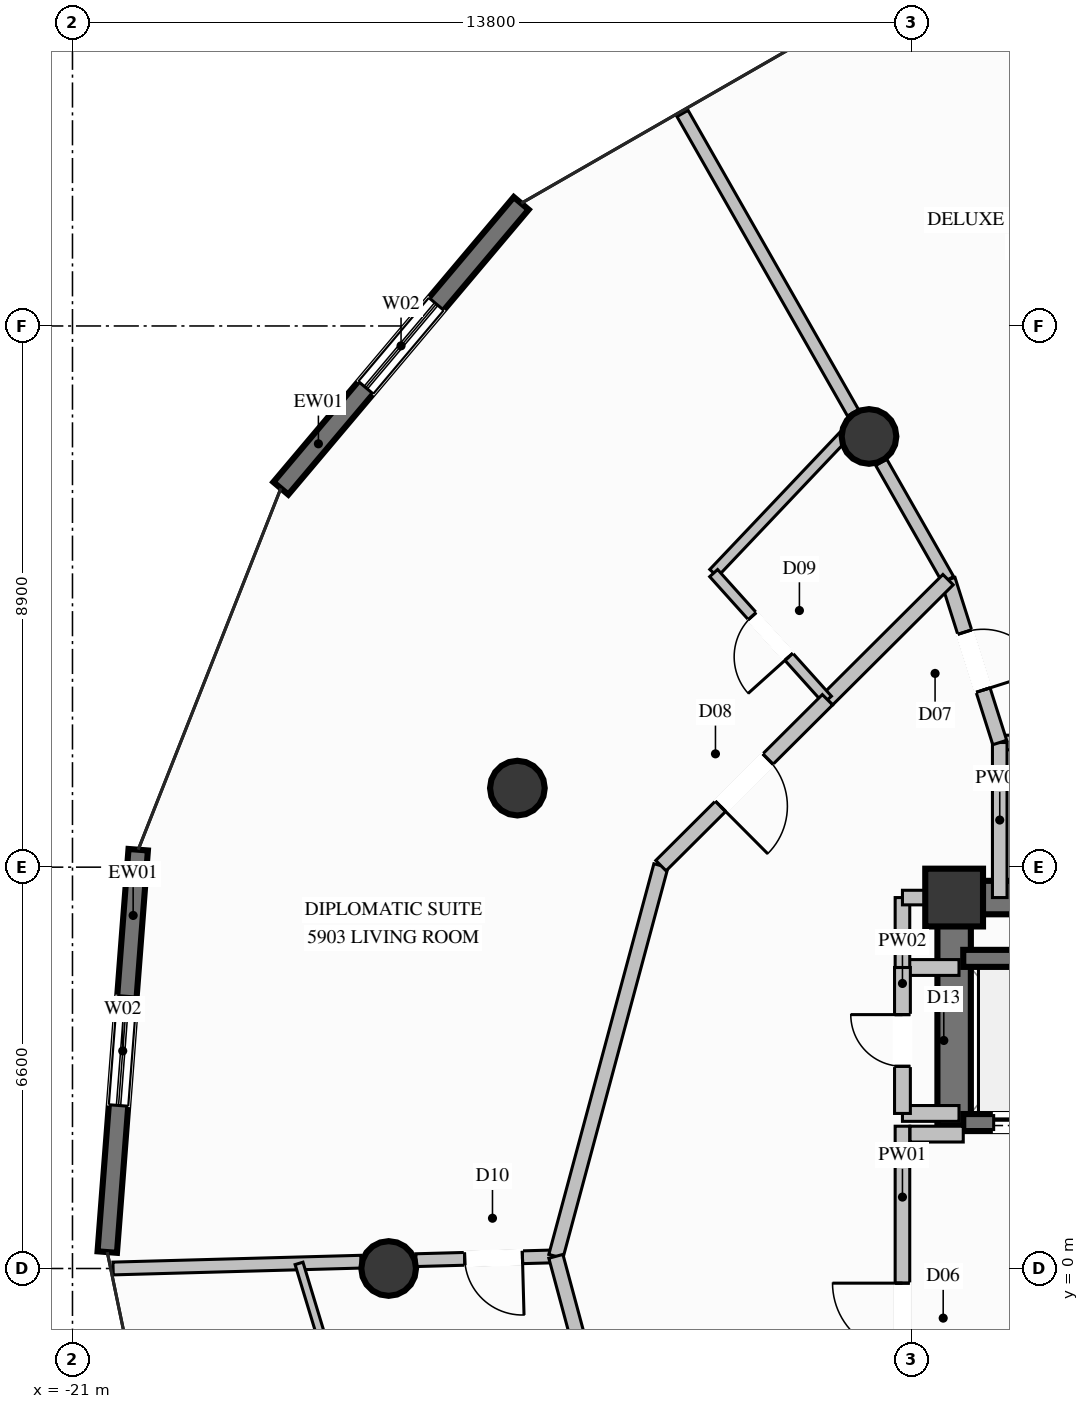
"""IFC4 building model, lengths in metres.
Left out: names, types, materials, properties, quantities, classifications, styles, units other than length and angle.
Written with IfcOpenShell. Run it as: python <this file> out.ifc"""

import sys

from ifc_helpers import new_model, si_unit, direction, frame, frame_2d, origin, origin_2d, place, context, subcontext, project, spatial, rectangle, circle, extrude, element, fill, save


model = new_model("IFC4")
c1 = context("Model", 3, precision=1e-05, world=origin(), true_north=direction((0.0, 1.0)))
c2 = subcontext(c1, "Body", "Model", "MODEL_VIEW")
j1 = project(units=[si_unit("LENGTHUNIT", "METRE"), si_unit("PLANEANGLEUNIT", "RADIAN")], contexts=[c1])
p1 = place(None, origin())
s1 = spatial("IfcSite", under=j1, at=p1, CompositionType="ELEMENT")
p2 = place(p1, origin())
s2 = spatial("IfcBuilding", under=s1, at=p2, CompositionType="ELEMENT")
p3 = place(p2, frame((0.0, 0.0, 220.0)))
s3 = spatial("IfcBuildingStorey", under=s2, at=p3, CompositionType="ELEMENT", Elevation=220.0)
p4 = place(p3, frame((-6.5, 6.1, 0.0), z_axis=(0.0, 0.0, 1.0), x_axis=(1.0, 0.0, 0.0)))
e1 = element("IfcColumn", 1, at=p4, inside=s3, PredefinedType="COLUMN", context=c2, shape_type="SweptSolid", body=[
    extrude(rectangle(XDim=0.95, YDim=0.95, at=origin_2d()), origin(), (0.0, 0.0, 1.0), 3.6),
])
p5 = place(p3, frame((-6.225, 6.1, 0.0), z_axis=(0.0, 0.0, 1.0), x_axis=(1.0, 0.0, 0.0)))
e2 = element("IfcWall", 2, at=p5, inside=s3, PredefinedType="SHEAR", context=c2, shape_type="SweptSolid", body=[
    extrude(rectangle(XDim=2.625, YDim=0.55, at=frame_2d((1.312, 0.0))), origin(), (0.0, 0.0, 1.0), 3.6),
])
p6 = place(p3, frame((-6.5, 2.35, 0.0), z_axis=(0.0, 0.0, 1.0), x_axis=(0.0, 1.0, 0.0)))
e3 = element("IfcWall", 3, at=p6, inside=s3, PredefinedType="SHEAR", context=c2, shape_type="SweptSolid", body=[
    extrude(rectangle(XDim=4.025, YDim=0.55, at=frame_2d((2.012, 0.0))), origin(), (0.0, 0.0, 1.0), 3.6),
])
for number, where, z_axis, x_axis in (
    (4, (-7.9, 13.683, 0.0), (0.0, 0.0, 1.0), (1.0, 0.0, 0.0)),
    (5, (-13.683, 7.9, 0.0), (0.0, 0.0, 1.0), (1.0, 0.0, 0.0)),
    (6, (-15.8, 0.0, 0.0), (0.0, 0.0, 1.0), (1.0, 0.0, 0.0)),
):
    element("IfcColumn", number, at=place(p3, frame(where, z_axis=z_axis, x_axis=x_axis)), inside=s3, PredefinedType="COLUMN", context=c2, shape_type="SweptSolid", body=[
        extrude(circle(Radius=0.45, at=origin_2d()), origin(), (0.0, 0.0, 1.0), 3.6),
    ])
p7 = place(p3, frame((-17.573, 12.83, 0.0), z_axis=(0.0, 0.0, 1.0), x_axis=(0.644700837275, 0.764434974616, 0.0)))
e7 = element("IfcWall", 7, at=p7, inside=s3, PredefinedType="SOLIDWALL", context=c2, shape_type="SweptSolid", body=[
    extrude(rectangle(XDim=6.131, YDim=0.32, at=frame_2d((3.066, 0.0))), origin(), (0.0, 0.0, 1.0), 3.36),
])
p8 = place(p7, frame((2.166, 0.0, 0.35)))
e8 = element("IfcOpeningElement", 8, at=p8, cuts=e7, PredefinedType="OPENING", context=c2, shape_type="SweptSolid", body=[
    extrude(rectangle(XDim=1.8, YDim=2.6, at=frame_2d((0.9, 1.3))), frame((0.0, 0.17, 0.0), z_axis=(0.0, -1.0, 0.0), x_axis=(1.0, 0.0, 0.0)), (0.0, 0.0, 1.0), 0.34),
])
p9 = place(p3, frame((-20.428, 0.27, 0.0), z_axis=(0.0, 0.0, 1.0), x_axis=(0.076702125221, 0.997054052691, 0.0)))
e9 = element("IfcWall", 9, at=p9, inside=s3, PredefinedType="SOLIDWALL", context=c2, shape_type="SweptSolid", body=[
    extrude(rectangle(XDim=6.636, YDim=0.32, at=frame_2d((3.318, 0.0))), origin(), (0.0, 0.0, 1.0), 3.36),
])
p10 = place(p9, frame((2.418, 0.0, 0.35)))
e10 = element("IfcOpeningElement", 10, at=p10, cuts=e9, PredefinedType="OPENING", context=c2, shape_type="SweptSolid", body=[
    extrude(rectangle(XDim=1.8, YDim=2.6, at=frame_2d((0.9, 1.3))), frame((0.0, 0.17, 0.0), z_axis=(0.0, -1.0, 0.0), x_axis=(1.0, 0.0, 0.0)), (0.0, 0.0, 1.0), 0.34),
])
p11 = place(p3, frame((-6.35, 2.4, 0.0), z_axis=(0.0, 0.0, 1.0), x_axis=(1.0, 0.0, 0.0)))
e11 = element("IfcWall", 11, at=p11, inside=s3, PredefinedType="SOLIDWALL", context=c2, shape_type="SweptSolid", body=[
    extrude(rectangle(XDim=2.2, YDim=0.28, at=frame_2d((1.1, 0.0))), origin(), (0.0, 0.0, 1.0), 3.36),
])
p12 = place(p11, frame((0.5, 0.0, 0.0)))
e12 = element("IfcOpeningElement", 12, at=p12, cuts=e11, PredefinedType="OPENING", context=c2, shape_type="SweptSolid", body=[
    extrude(rectangle(XDim=1.2, YDim=2.2, at=frame_2d((0.6, 1.1))), frame((0.0, 0.15, 0.0), z_axis=(0.0, -1.0, 0.0), x_axis=(1.0, 0.0, 0.0)), (0.0, 0.0, 1.0), 0.3),
])
p13 = place(p3, frame((-4.15, 5.1, 0.0), z_axis=(0.0, 0.0, 1.0), x_axis=(-1.0, 0.0, 0.0)))
e13 = element("IfcWall", 13, at=p13, inside=s3, PredefinedType="SOLIDWALL", context=c2, shape_type="SweptSolid", body=[
    extrude(rectangle(XDim=2.2, YDim=0.28, at=frame_2d((1.1, 0.0))), origin(), (0.0, 0.0, 1.0), 3.36),
])
p14 = place(p3, frame((-7.35, -2.78, 0.0), z_axis=(0.0, 0.0, 1.0), x_axis=(0.0, 1.0, 0.0)))
e14 = element("IfcWall", 14, at=p14, inside=s3, PredefinedType="PARTITIONING", context=c2, shape_type="SweptSolid", body=[
    extrude(rectangle(XDim=5.12, YDim=0.24, at=frame_2d((2.56, 0.0))), origin(), (0.0, 0.0, 1.0), 2.445),
])
p15 = place(p14, frame((1.389, 0.0, 0.0)))
e15 = element("IfcOpeningElement", 15, at=p15, cuts=e14, PredefinedType="OPENING", context=c2, shape_type="SweptSolid", body=[
    extrude(rectangle(XDim=1.15, YDim=2.2, at=frame_2d((0.575, 1.1))), frame((0.0, 0.13, 0.0), z_axis=(0.0, -1.0, 0.0), x_axis=(1.0, 0.0, 0.0)), (0.0, 0.0, 1.0), 0.26),
])
p16 = place(p3, frame((-7.225, 2.21, 0.0), z_axis=(0.0, 0.0, 1.0), x_axis=(1.0, 0.0, 0.0)))
e16 = element("IfcWall", 16, at=p16, inside=s3, PredefinedType="PARTITIONING", context=c2, shape_type="SweptSolid", body=[
    extrude(rectangle(XDim=0.875, YDim=0.26, at=frame_2d((0.438, 0.0))), origin(), (0.0, 0.0, 1.0), 3.36),
])
for number, where, z_axis, x_axis in (
    (17, (-7.35, 4.95, 0.0), (0.0, 0.0, 1.0), (1.0, 0.0, 0.0)),
    (18, (-7.35, 2.55, 0.0), (0.0, 0.0, 1.0), (1.0, 0.0, 0.0)),
):
    element("IfcWall", number, at=place(p3, frame(where, z_axis=z_axis, x_axis=x_axis)), inside=s3, PredefinedType="PARTITIONING", context=c2, shape_type="SweptSolid", body=[
        extrude(rectangle(XDim=0.93, YDim=0.26, at=frame_2d((0.465, 0.0))), origin(), (0.0, 0.0, 1.0), 3.36),
    ])
p17 = place(p3, frame((-7.35, 2.55, 0.0), z_axis=(0.0, 0.0, 1.0), x_axis=(0.0, 1.0, 0.0)))
e19 = element("IfcWall", 19, at=p17, inside=s3, PredefinedType="PARTITIONING", context=c2, shape_type="SweptSolid", body=[
    extrude(rectangle(XDim=2.4, YDim=0.26, at=frame_2d((1.2, 0.0))), origin(), (0.0, 0.0, 1.0), 2.445),
])
p18 = place(p17, frame((0.775, 0.0, 0.0)))
e20 = element("IfcOpeningElement", 20, at=p18, cuts=e19, PredefinedType="OPENING", context=c2, shape_type="SweptSolid", body=[
    extrude(rectangle(XDim=0.85, YDim=2.05, at=frame_2d((0.425, 1.025))), frame((0.0, 0.14, 0.0), z_axis=(0.0, -1.0, 0.0), x_axis=(1.0, 0.0, 0.0)), (0.0, 0.0, 1.0), 0.28),
])
p19 = place(p3, frame((-5.75, 8.65, 0.0), z_axis=(0.0, 0.0, 1.0), x_axis=(1.0, 0.0, 0.0)))
e21 = element("IfcWall", 21, at=p19, inside=s3, PredefinedType="PARTITIONING", context=c2, shape_type="SweptSolid", body=[
    extrude(rectangle(XDim=13.1, YDim=0.24, at=frame_2d((6.55, 0.0))), origin(), (0.0, 0.0, 1.0), 3.36),
])
p20 = place(p3, frame((-5.75, 6.1, 0.0), z_axis=(0.0, 0.0, 1.0), x_axis=(0.0, 1.0, 0.0)))
e22 = element("IfcWall", 22, at=p20, inside=s3, PredefinedType="PARTITIONING", context=c2, shape_type="SweptSolid", body=[
    extrude(rectangle(XDim=2.55, YDim=0.24, at=frame_2d((1.275, 0.0))), origin(), (0.0, 0.0, 1.0), 3.36),
])
p21 = place(p3, frame((-7.35, 4.95, 0.0), z_axis=(0.0, 0.0, 1.0), x_axis=(0.0, 1.0, 0.0)))
e23 = element("IfcWall", 23, at=p21, inside=s3, PredefinedType="PARTITIONING", context=c2, shape_type="SweptSolid", body=[
    extrude(rectangle(XDim=1.15, YDim=0.24, at=frame_2d((0.575, 0.0))), origin(), (0.0, 0.0, 1.0), 2.445),
])
p22 = place(p3, frame((-7.35, 6.1, 0.0), z_axis=(0.0, 0.0, 1.0), x_axis=(1.0, 0.0, 0.0)))
e24 = element("IfcWall", 24, at=p22, inside=s3, PredefinedType="PARTITIONING", context=c2, shape_type="SweptSolid", body=[
    extrude(rectangle(XDim=0.85, YDim=0.24, at=frame_2d((0.425, 0.0))), origin(), (0.0, 0.0, 1.0), 2.877),
])
p23 = place(p3, frame((-6.6, 11.328, 0.0), z_axis=(0.0, 0.0, 1.0), x_axis=(-0.494753305644, 0.869033466878, 0.0)))
e25 = element("IfcWall", 25, at=p23, inside=s3, PredefinedType="PARTITIONING", context=c2, shape_type="SweptSolid", body=[
    extrude(rectangle(XDim=2.221, YDim=0.21, at=frame_2d((1.11, 0.0))), origin(), (0.0, 0.0, 1.0), 2.877),
])
p24 = place(p3, frame((-8.163, 14.072, 0.0), z_axis=(0.0, 0.0, 1.0), x_axis=(-0.494908668638, 0.868944998091, 0.0)))
e26 = element("IfcWall", 26, at=p24, inside=s3, PredefinedType="PARTITIONING", context=c2, shape_type="SweptSolid", body=[
    extrude(rectangle(XDim=5.666, YDim=0.21, at=frame_2d((2.833, 0.0))), origin(), (0.0, 0.0, 1.0), 3.36),
])
p25 = place(p3, frame((-13.05, 0.2, 0.0), z_axis=(0.0, 0.0, 1.0), x_axis=(-0.999625224484, -0.02737536439, 0.0)))
e27 = element("IfcWall", 27, at=p25, inside=s3, PredefinedType="PARTITIONING", context=c2, shape_type="SweptSolid", body=[
    extrude(rectangle(XDim=2.301, YDim=0.21, at=frame_2d((1.15, 0.0))), origin(), (0.0, 0.0, 1.0), 3.36),
])
p26 = place(p25, frame((0.55, 0.0, 0.0)))
e28 = element("IfcOpeningElement", 28, at=p26, cuts=e27, PredefinedType="OPENING", context=c2, shape_type="SweptSolid", body=[
    extrude(rectangle(XDim=0.95, YDim=2.1, at=frame_2d((0.475, 1.05))), frame((0.0, 0.115, 0.0), z_axis=(0.0, -1.0, 0.0), x_axis=(1.0, 0.0, 0.0)), (0.0, 0.0, 1.0), 0.23),
])
p27 = place(p3, frame((-16.256, 0.112, 0.0), z_axis=(0.0, 0.0, 1.0), x_axis=(-0.99962227441, -0.027482876547, 0.0)))
e29 = element("IfcWall", 29, at=p27, inside=s3, PredefinedType="PARTITIONING", context=c2, shape_type="SweptSolid", body=[
    extrude(rectangle(XDim=4.077, YDim=0.21, at=frame_2d((2.039, 0.0))), origin(), (0.0, 0.0, 1.0), 3.36),
])
p28 = place(p3, frame((-6.6, 11.328, 0.0), z_axis=(0.0, 0.0, 1.0), x_axis=(0.30256159068, -0.953129835775, 0.0)))
e30 = element("IfcWall", 30, at=p28, inside=s3, PredefinedType="PARTITIONING", context=c2, shape_type="SweptSolid", body=[
    extrude(rectangle(XDim=2.81, YDim=0.24, at=frame_2d((1.405, 0.0))), origin(), (0.0, 0.0, 1.0), 3.36),
])
p29 = place(p28, frame((0.905, 0.0, 0.0)))
e31 = element("IfcOpeningElement", 31, at=p29, cuts=e30, PredefinedType="OPENING", context=c2, shape_type="SweptSolid", body=[
    extrude(rectangle(XDim=1.0, YDim=2.2, at=frame_2d((0.5, 1.1))), frame((0.0, 0.13, 0.0), z_axis=(0.0, -1.0, 0.0), x_axis=(1.0, 0.0, 0.0)), (0.0, 0.0, 1.0), 0.26),
])
p30 = place(p3, frame((-6.6, 11.328, 0.0), z_axis=(0.0, 0.0, 1.0), x_axis=(-0.708544738437, -0.705665893772, 0.0)))
e32 = element("IfcWall", 32, at=p30, inside=s3, PredefinedType="PARTITIONING", context=c2, shape_type="SweptSolid", body=[
    extrude(rectangle(XDim=2.799, YDim=0.24, at=frame_2d((1.399, 0.0))), origin(), (0.0, 0.0, 1.0), 3.36),
])
p31 = place(p3, frame((-8.085, 13.935, 0.0), z_axis=(0.0, 0.0, 1.0), x_axis=(-0.688145634745, -0.725572591394, 0.0)))
e33 = element("IfcWall", 33, at=p31, inside=s3, PredefinedType="PLUMBINGWALL", context=c2, shape_type="SweptSolid", body=[
    extrude(rectangle(XDim=3.444, YDim=0.175, at=frame_2d((1.722, 0.0))), origin(), (0.0, 0.0, 1.0), 2.929),
])
p32 = place(p3, frame((-8.583, 9.353, 0.0), z_axis=(0.0, 0.0, 1.0), x_axis=(-0.668444418094, 0.743762099006, 0.0)))
e34 = element("IfcWall", 34, at=p32, inside=s3, PredefinedType="PLUMBINGWALL", context=c2, shape_type="SweptSolid", body=[
    extrude(rectangle(XDim=2.801, YDim=0.175, at=frame_2d((1.4, 0.0))), origin(), (0.0, 0.0, 1.0), 3.36),
])
p33 = place(p32, frame((0.95, 0.0, 0.0)))
e35 = element("IfcOpeningElement", 35, at=p33, cuts=e34, PredefinedType="OPENING", context=c2, shape_type="SweptSolid", body=[
    extrude(rectangle(XDim=0.9, YDim=2.1, at=frame_2d((0.45, 1.05))), frame((0.0, 0.098, 0.0), z_axis=(0.0, -1.0, 0.0), x_axis=(1.0, 0.0, 0.0)), (0.0, 0.0, 1.0), 0.195),
])
p34 = place(p3, frame((-11.322, 6.625, 0.0), z_axis=(0.0, 0.0, 1.0), x_axis=(-0.259722121469, -0.965683395125, 0.0)))
e36 = element("IfcWall", 36, at=p34, inside=s3, PredefinedType="PARTITIONING", context=c2, shape_type="SweptSolid", body=[
    extrude(rectangle(XDim=6.653, YDim=0.24, at=frame_2d((3.327, 0.0))), origin(), (0.0, 0.0, 1.0), 3.36),
])
p35 = place(p3, frame((-8.583, 9.353, 0.0), z_axis=(0.0, 0.0, 1.0), x_axis=(-0.70852632163, -0.70568438523, 0.0)))
e37 = element("IfcWall", 37, at=p35, inside=s3, PredefinedType="PARTITIONING", context=c2, shape_type="SweptSolid", body=[
    extrude(rectangle(XDim=3.866, YDim=0.24, at=frame_2d((1.933, 0.0))), origin(), (0.0, 0.0, 1.0), 3.36),
])
p36 = place(p35, frame((1.383, 0.0, 0.0)))
e38 = element("IfcOpeningElement", 38, at=p36, cuts=e37, PredefinedType="OPENING", context=c2, shape_type="SweptSolid", body=[
    extrude(rectangle(XDim=1.1, YDim=2.3, at=frame_2d((0.55, 1.15))), frame((0.0, 0.13, 0.0), z_axis=(0.0, -1.0, 0.0), x_axis=(1.0, 0.0, 0.0)), (0.0, 0.0, 1.0), 0.26),
])
p37 = place(p3, frame((-13.05, 0.2, 0.0), z_axis=(0.0, 0.0, 1.0), x_axis=(0.259722121469, -0.965683395125, 0.0)))
e39 = element("IfcWall", 39, at=p37, inside=s3, PredefinedType="PARTITIONING", context=c2, shape_type="SweptSolid", body=[
    extrude(rectangle(XDim=6.653, YDim=0.24, at=frame_2d((3.327, 0.0))), origin(), (0.0, 0.0, 1.0), 3.36),
])
p38 = place(p3, frame((-17.274, 0.084, 0.0), z_axis=(0.0, 0.0, 1.0), x_axis=(0.290378939447, -0.956911736539, 0.0)))
e40 = element("IfcWall", 40, at=p38, inside=s3, PredefinedType="PARTITIONING", context=c2, shape_type="SweptSolid", body=[
    extrude(rectangle(XDim=8.826, YDim=0.135, at=frame_2d((4.413, 0.0))), origin(), (0.0, 0.0, 1.0), 3.36),
])
p39 = place(p38, frame((3.938, 0.0, 0.0)))
e41 = element("IfcOpeningElement", 41, at=p39, cuts=e40, PredefinedType="OPENING", context=c2, shape_type="SweptSolid", body=[
    extrude(rectangle(XDim=0.95, YDim=2.1, at=frame_2d((0.475, 1.05))), frame((0.0, 0.078, 0.0), z_axis=(0.0, -1.0, 0.0), x_axis=(1.0, 0.0, 0.0)), (0.0, 0.0, 1.0), 0.155),
])
p40 = place(p8, origin())
e42 = element("IfcWindow", 42, at=p40, inside=s3, PartitioningType="SINGLE_PANEL", PredefinedType="WINDOW", context=c2, shape_type="SweptSolid", body=[
    extrude(rectangle(XDim=1.8, YDim=2.6, at=frame_2d((0.9, 1.3))), frame((0.0, 0.03, 0.0), z_axis=(0.0, -1.0, 0.0), x_axis=(1.0, 0.0, 0.0)), (0.0, 0.0, 1.0), 0.06),
])
fill(e8, e42)
p41 = place(p10, origin())
e43 = element("IfcWindow", 43, at=p41, inside=s3, PartitioningType="SINGLE_PANEL", PredefinedType="WINDOW", context=c2, shape_type="SweptSolid", body=[
    extrude(rectangle(XDim=1.8, YDim=2.6, at=frame_2d((0.9, 1.3))), frame((0.0, 0.03, 0.0), z_axis=(0.0, -1.0, 0.0), x_axis=(1.0, 0.0, 0.0)), (0.0, 0.0, 1.0), 0.06),
])
fill(e10, e43)
p42 = place(p12, origin())
e44 = element("IfcDoor", 44, at=p42, inside=s3, OperationType="SLIDING_TO_LEFT", PredefinedType="DOOR", context=c2, shape_type="SweptSolid", body=[
    extrude(rectangle(XDim=1.2, YDim=2.2, at=frame_2d((0.6, 1.1))), frame((0.0, 0.025, 0.0), z_axis=(0.0, -1.0, 0.0), x_axis=(1.0, 0.0, 0.0)), (0.0, 0.0, 1.0), 0.05),
])
fill(e12, e44)
p43 = place(p15, origin())
e45 = element("IfcDoor", 45, at=p43, inside=s3, OperationType="SINGLE_SWING_RIGHT", PredefinedType="DOOR", context=c2, shape_type="SweptSolid", body=[
    extrude(rectangle(XDim=1.15, YDim=2.2, at=frame_2d((0.575, 1.1))), frame((0.0, 0.025, 0.0), z_axis=(0.0, -1.0, 0.0), x_axis=(1.0, 0.0, 0.0)), (0.0, 0.0, 1.0), 0.05),
])
fill(e15, e45)
p44 = place(p18, origin())
e46 = element("IfcDoor", 46, at=p44, inside=s3, OperationType="SINGLE_SWING_RIGHT", PredefinedType="DOOR", context=c2, shape_type="SweptSolid", body=[
    extrude(rectangle(XDim=0.85, YDim=2.05, at=frame_2d((0.425, 1.025))), frame((0.0, 0.025, 0.0), z_axis=(0.0, -1.0, 0.0), x_axis=(1.0, 0.0, 0.0)), (0.0, 0.0, 1.0), 0.05),
])
fill(e20, e46)
p45 = place(p29, origin())
e47 = element("IfcDoor", 47, at=p45, inside=s3, OperationType="SINGLE_SWING_RIGHT", PredefinedType="DOOR", context=c2, shape_type="SweptSolid", body=[
    extrude(rectangle(XDim=1.0, YDim=2.2, at=frame_2d((0.5, 1.1))), frame((0.0, 0.025, 0.0), z_axis=(0.0, -1.0, 0.0), x_axis=(1.0, 0.0, 0.0)), (0.0, 0.0, 1.0), 0.05),
])
fill(e31, e47)
p46 = place(p33, origin())
e48 = element("IfcDoor", 48, at=p46, inside=s3, OperationType="SINGLE_SWING_LEFT", PredefinedType="DOOR", context=c2, shape_type="SweptSolid", body=[
    extrude(rectangle(XDim=0.9, YDim=2.1, at=frame_2d((0.45, 1.05))), frame((0.0, 0.025, 0.0), z_axis=(0.0, -1.0, 0.0), x_axis=(1.0, 0.0, 0.0)), (0.0, 0.0, 1.0), 0.05),
])
fill(e35, e48)
p47 = place(p36, origin())
e49 = element("IfcDoor", 49, at=p47, inside=s3, OperationType="SINGLE_SWING_RIGHT", PredefinedType="DOOR", context=c2, shape_type="SweptSolid", body=[
    extrude(rectangle(XDim=1.1, YDim=2.3, at=frame_2d((0.55, 1.15))), frame((0.0, 0.025, 0.0), z_axis=(0.0, -1.0, 0.0), x_axis=(1.0, 0.0, 0.0)), (0.0, 0.0, 1.0), 0.05),
])
fill(e38, e49)
p48 = place(p26, origin())
e50 = element("IfcDoor", 50, at=p48, inside=s3, OperationType="SINGLE_SWING_LEFT", PredefinedType="DOOR", context=c2, shape_type="SweptSolid", body=[
    extrude(rectangle(XDim=0.95, YDim=2.1, at=frame_2d((0.475, 1.05))), frame((0.0, 0.025, 0.0), z_axis=(0.0, -1.0, 0.0), x_axis=(1.0, 0.0, 0.0)), (0.0, 0.0, 1.0), 0.05),
])
fill(e28, e50)
save(model, sys.argv[1])
